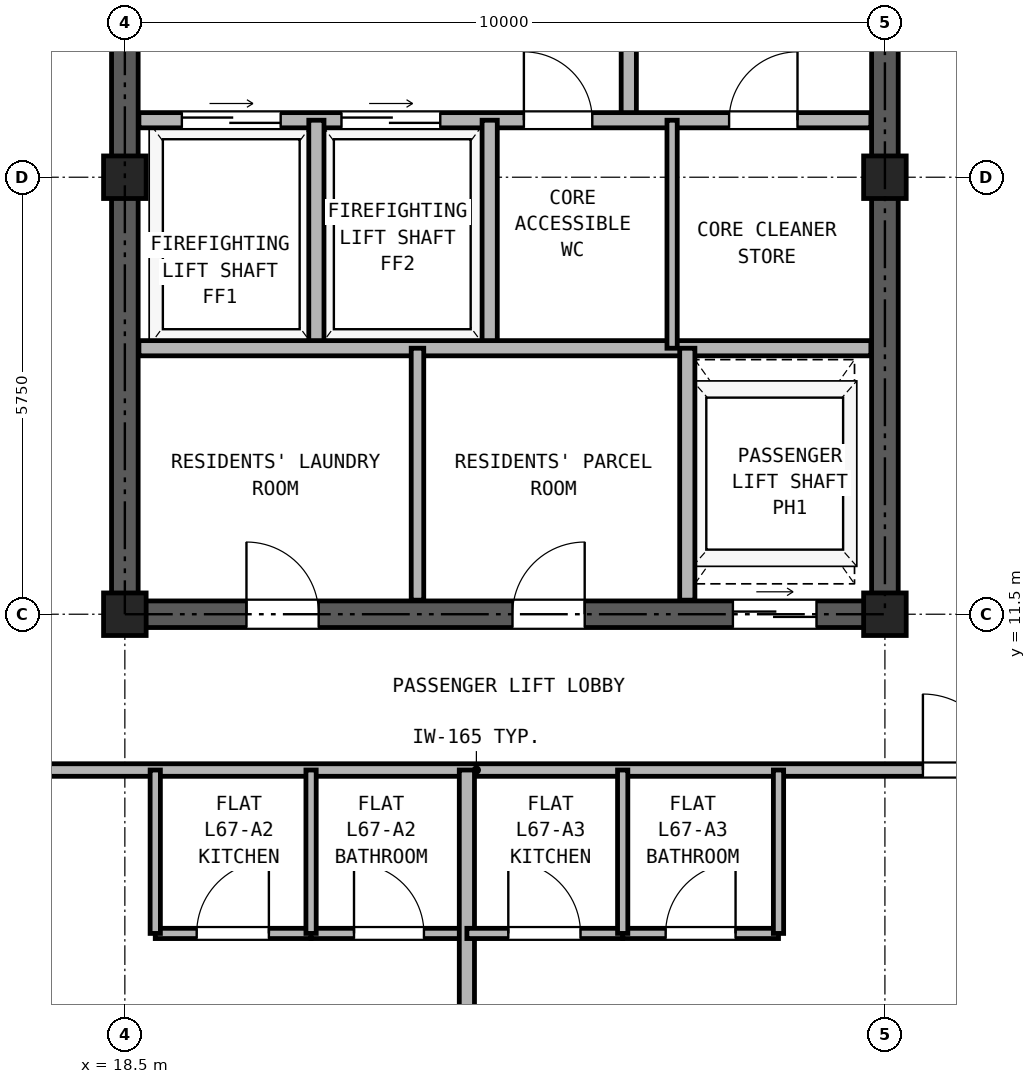
"""IFC4 building model, lengths in metres.
Left out: names, types, materials, properties, quantities, classifications, styles, units other than length and angle.
Written with IfcOpenShell. Run it as: python <this file> out.ifc"""

import sys

from ifc_helpers import new_model, si_unit, direction, frame, frame_2d, origin, origin_2d, place, context, subcontext, project, spatial, rectangle, hollow_rectangle, extrude, source, transform, mapped, element, fill, save


model = new_model("IFC4")
c1 = context("Model", 3, precision=1e-05, world=origin(), true_north=direction((0.0, 1.0)))
c2 = subcontext(c1, "Body", "Model", "MODEL_VIEW")
j1 = project(units=[si_unit("LENGTHUNIT", "METRE"), si_unit("PLANEANGLEUNIT", "RADIAN")], contexts=[c1])
p1 = place(None, origin())
s1 = spatial("IfcSite", under=j1, at=p1, CompositionType="ELEMENT")
p2 = place(p1, origin())
s2 = spatial("IfcBuilding", under=s1, at=p2, CompositionType="ELEMENT")
p3 = place(p2, frame((0.0, 0.0, 236.1)))
s3 = spatial("IfcBuildingStorey", under=s2, at=p3, CompositionType="ELEMENT", Elevation=236.1)
m1 = source(origin(), c2, "Body", "SweptSolid", [
    extrude(hollow_rectangle(XDim=0.56, YDim=0.56, WallThickness=0.03, at=origin_2d()), origin(), (0.0, 0.0, 1.0), 2.98),
])
for number, where, z_axis, x_axis in (
    (1, (18.5, 11.5, 0.0), (0.0, 0.0, 1.0), (1.0, 0.0, 0.0)),
    (2, (18.5, 17.25, 0.0), (0.0, 0.0, 1.0), (1.0, 0.0, 0.0)),
    (3, (28.5, 11.5, 0.0), (0.0, 0.0, 1.0), (1.0, 0.0, 0.0)),
    (4, (28.5, 17.25, 0.0), (0.0, 0.0, 1.0), (1.0, 0.0, 0.0)),
):
    element("IfcColumn", number, at=place(p3, frame(where, z_axis=z_axis, x_axis=x_axis)), inside=s3, PredefinedType="COLUMN", context=c2, shape_type="MappedRepresentation", body=[
        mapped(m1, transform((0.0, 0.0, 0.0), x_axis=(1.0, 0.0, 0.0), y_axis=(0.0, 1.0, 0.0), z_axis=(0.0, 0.0, 1.0), scale=1.0)),
    ])
p4 = place(p3, frame((18.325, 11.5, 0.0), z_axis=(0.0, 0.0, 1.0), x_axis=(1.0, 0.0, 0.0)))
e5 = element("IfcWall", 5, at=p4, inside=s3, PredefinedType="SHEAR", context=c2, shape_type="SweptSolid", body=[
    extrude(rectangle(XDim=10.35, YDim=0.35, at=frame_2d((5.175, 0.0))), origin(), (0.0, 0.0, 1.0), 2.98),
])
p5 = place(p4, frame((1.775, 0.0, 0.0)))
e6 = element("IfcOpeningElement", 6, at=p5, cuts=e5, PredefinedType="OPENING", context=c2, shape_type="SweptSolid", body=[
    extrude(rectangle(XDim=0.95, YDim=2.15, at=frame_2d((0.475, 1.075))), frame((0.0, 0.185, 0.0), z_axis=(0.0, -1.0, 0.0), x_axis=(1.0, 0.0, 0.0)), (0.0, 0.0, 1.0), 0.37),
])
p6 = place(p4, frame((5.275, 0.0, 0.0)))
e7 = element("IfcOpeningElement", 7, at=p6, cuts=e5, PredefinedType="OPENING", context=c2, shape_type="SweptSolid", body=[
    extrude(rectangle(XDim=0.95, YDim=2.15, at=frame_2d((0.475, 1.075))), frame((0.0, 0.185, 0.0), z_axis=(0.0, -1.0, 0.0), x_axis=(1.0, 0.0, 0.0)), (0.0, 0.0, 1.0), 0.37),
])
p7 = place(p4, frame((8.175, 0.0, 0.0)))
e8 = element("IfcOpeningElement", 8, at=p7, cuts=e5, PredefinedType="OPENING", context=c2, shape_type="SweptSolid", body=[
    extrude(rectangle(XDim=1.1, YDim=2.25, at=frame_2d((0.55, 1.125))), frame((0.0, 0.185, 0.0), z_axis=(0.0, -1.0, 0.0), x_axis=(1.0, 0.0, 0.0)), (0.0, 0.0, 1.0), 0.37),
])
p8 = place(p3, frame((18.5, 11.675, 0.0), z_axis=(0.0, 0.0, 1.0), x_axis=(0.0, 1.0, 0.0)))
e9 = element("IfcWall", 9, at=p8, inside=s3, PredefinedType="SHEAR", context=c2, shape_type="SweptSolid", body=[
    extrude(rectangle(XDim=16.9, YDim=0.35, at=frame_2d((8.45, 0.0))), origin(), (0.0, 0.0, 1.0), 2.98),
])
p9 = place(p8, frame((7.475, 0.0, 0.0)))
e10 = element("IfcOpeningElement", 10, at=p9, cuts=e9, PredefinedType="OPENING", context=c2, shape_type="SweptSolid", body=[
    extrude(rectangle(XDim=1.15, YDim=2.2, at=frame_2d((0.575, 1.1))), frame((0.0, 0.185, 0.0), z_axis=(0.0, -1.0, 0.0), x_axis=(1.0, 0.0, 0.0)), (0.0, 0.0, 1.0), 0.37),
])
p10 = place(p3, frame((28.5, 11.675, 0.0), z_axis=(0.0, 0.0, 1.0), x_axis=(0.0, 1.0, 0.0)))
e11 = element("IfcWall", 11, at=p10, inside=s3, PredefinedType="SHEAR", context=c2, shape_type="SweptSolid", body=[
    extrude(rectangle(XDim=16.9, YDim=0.35, at=frame_2d((8.45, 0.0))), origin(), (0.0, 0.0, 1.0), 2.98),
])
p11 = place(p10, frame((7.475, 0.0, 0.0)))
e12 = element("IfcOpeningElement", 12, at=p11, cuts=e11, PredefinedType="OPENING", context=c2, shape_type="SweptSolid", body=[
    extrude(rectangle(XDim=1.15, YDim=2.2, at=frame_2d((0.575, 1.1))), frame((0.0, 0.185, 0.0), z_axis=(0.0, -1.0, 0.0), x_axis=(1.0, 0.0, 0.0)), (0.0, 0.0, 1.0), 0.37),
])
p12 = place(p3, frame((25.13, 18.0, 0.0), z_axis=(0.0, 0.0, 1.0), x_axis=(0.0, 1.0, 0.0)))
e13 = element("IfcWall", 13, at=p12, inside=s3, PredefinedType="PARTITIONING", context=c2, shape_type="SweptSolid", body=[
    extrude(rectangle(XDim=3.39, YDim=0.2, at=frame_2d((1.695, 0.0))), origin(), (0.0, 0.0, 1.0), 2.98),
])
p13 = place(p12, frame((1.1, 0.0, 0.0)))
e14 = element("IfcOpeningElement", 14, at=p13, cuts=e13, PredefinedType="OPENING", context=c2, shape_type="SweptSolid", body=[
    extrude(rectangle(XDim=1.15, YDim=2.2, at=frame_2d((0.575, 1.1))), frame((0.0, 0.11, 0.0), z_axis=(0.0, -1.0, 0.0), x_axis=(1.0, 0.0, 0.0)), (0.0, 0.0, 1.0), 0.22),
])
p14 = place(p3, frame((18.685, 18.0, 0.0), z_axis=(0.0, 0.0, 1.0), x_axis=(1.0, 0.0, 0.0)))
e15 = element("IfcWall", 15, at=p14, inside=s3, PredefinedType="PARTITIONING", context=c2, shape_type="SweptSolid", body=[
    extrude(rectangle(XDim=9.63, YDim=0.2, at=frame_2d((4.815, 0.0))), origin(), (0.0, 0.0, 1.0), 2.98),
])
p15 = place(p14, frame((0.565, 0.0, 0.0)))
e16 = element("IfcOpeningElement", 16, at=p15, cuts=e15, PredefinedType="OPENING", context=c2, shape_type="SweptSolid", body=[
    extrude(rectangle(XDim=1.3, YDim=2.3, at=frame_2d((0.65, 1.15))), frame((0.0, 0.11, 0.0), z_axis=(0.0, -1.0, 0.0), x_axis=(1.0, 0.0, 0.0)), (0.0, 0.0, 1.0), 0.22),
])
p16 = place(p14, frame((2.665, 0.0, 0.0)))
e17 = element("IfcOpeningElement", 17, at=p16, cuts=e15, PredefinedType="OPENING", context=c2, shape_type="SweptSolid", body=[
    extrude(rectangle(XDim=1.3, YDim=2.3, at=frame_2d((0.65, 1.15))), frame((0.0, 0.11, 0.0), z_axis=(0.0, -1.0, 0.0), x_axis=(1.0, 0.0, 0.0)), (0.0, 0.0, 1.0), 0.22),
])
p17 = place(p14, frame((5.065, 0.0, 0.0)))
e18 = element("IfcOpeningElement", 18, at=p17, cuts=e15, PredefinedType="OPENING", context=c2, shape_type="SweptSolid", body=[
    extrude(rectangle(XDim=0.9, YDim=2.05, at=frame_2d((0.45, 1.025))), frame((0.0, 0.11, 0.0), z_axis=(0.0, -1.0, 0.0), x_axis=(1.0, 0.0, 0.0)), (0.0, 0.0, 1.0), 0.22),
])
p18 = place(p14, frame((7.765, 0.0, 0.0)))
e19 = element("IfcOpeningElement", 19, at=p18, cuts=e15, PredefinedType="OPENING", context=c2, shape_type="SweptSolid", body=[
    extrude(rectangle(XDim=0.9, YDim=2.05, at=frame_2d((0.45, 1.025))), frame((0.0, 0.11, 0.0), z_axis=(0.0, -1.0, 0.0), x_axis=(1.0, 0.0, 0.0)), (0.0, 0.0, 1.0), 0.22),
])
for number, where, z_axis, x_axis in (
    (20, (21.02, 15.0, 0.0), (0.0, 0.0, 1.0), (0.0, 1.0, 0.0)),
    (21, (23.3, 15.0, 0.0), (0.0, 0.0, 1.0), (0.0, 1.0, 0.0)),
):
    element("IfcWall", number, at=place(p3, frame(where, z_axis=z_axis, x_axis=x_axis)), inside=s3, PredefinedType="PARTITIONING", context=c2, shape_type="SweptSolid", body=[
        extrude(rectangle(XDim=3.0, YDim=0.2, at=frame_2d((1.5, 0.0))), origin(), (0.0, 0.0, 1.0), 2.98),
    ])
p19 = place(p3, frame((18.685, 15.0, 0.0), z_axis=(0.0, 0.0, 1.0), x_axis=(1.0, 0.0, 0.0)))
e22 = element("IfcWall", 22, at=p19, inside=s3, PredefinedType="PARTITIONING", context=c2, shape_type="SweptSolid", body=[
    extrude(rectangle(XDim=9.63, YDim=0.2, at=frame_2d((4.815, 0.0))), origin(), (0.0, 0.0, 1.0), 2.98),
])
p20 = place(p3, frame((25.7, 15.0, 0.0), z_axis=(0.0, 0.0, 1.0), x_axis=(0.0, 1.0, 0.0)))
e23 = element("IfcWall", 23, at=p20, inside=s3, PredefinedType="PARTITIONING", context=c2, shape_type="SweptSolid", body=[
    extrude(rectangle(XDim=3.0, YDim=0.135, at=frame_2d((1.5, 0.0))), origin(), (0.0, 0.0, 1.0), 2.98),
])
p21 = place(p3, frame((22.35, 11.685, 0.0), z_axis=(0.0, 0.0, 1.0), x_axis=(0.0, 1.0, 0.0)))
e24 = element("IfcWall", 24, at=p21, inside=s3, PredefinedType="PARTITIONING", context=c2, shape_type="SweptSolid", body=[
    extrude(rectangle(XDim=3.315, YDim=0.165, at=frame_2d((1.657, 0.0))), origin(), (0.0, 0.0, 1.0), 2.98),
])
p22 = place(p3, frame((25.9, 11.685, 0.0), z_axis=(0.0, 0.0, 1.0), x_axis=(0.0, 1.0, 0.0)))
e25 = element("IfcWall", 25, at=p22, inside=s3, PredefinedType="PARTITIONING", context=c2, shape_type="SweptSolid", body=[
    extrude(rectangle(XDim=3.315, YDim=0.2, at=frame_2d((1.657, 0.0))), origin(), (0.0, 0.0, 1.0), 2.98),
])
p23 = place(p3, frame((5.36, 9.45, 0.0), z_axis=(0.0, 0.0, 1.0), x_axis=(1.0, 0.0, 0.0)))
e26 = element("IfcWall", 26, at=p23, inside=s3, PredefinedType="PARTITIONING", context=c2, shape_type="SweptSolid", body=[
    extrude(rectangle(XDim=36.28, YDim=0.165, at=frame_2d((18.14, 0.0))), origin(), (0.0, 0.0, 1.0), 2.98),
])
p24 = place(p23, frame((7.115, 0.0, 0.0)))
e27 = element("IfcOpeningElement", 27, at=p24, cuts=e26, PredefinedType="OPENING", context=c2, shape_type="SweptSolid", body=[
    extrude(rectangle(XDim=1.0, YDim=2.15, at=frame_2d((0.5, 1.075))), frame((0.0, 0.093, 0.0), z_axis=(0.0, -1.0, 0.0), x_axis=(1.0, 0.0, 0.0)), (0.0, 0.0, 1.0), 0.185),
])
p25 = place(p23, frame((10.89, 0.0, 0.0)))
e28 = element("IfcOpeningElement", 28, at=p25, cuts=e26, PredefinedType="OPENING", context=c2, shape_type="SweptSolid", body=[
    extrude(rectangle(XDim=1.0, YDim=2.15, at=frame_2d((0.5, 1.075))), frame((0.0, 0.093, 0.0), z_axis=(0.0, -1.0, 0.0), x_axis=(1.0, 0.0, 0.0)), (0.0, 0.0, 1.0), 0.185),
])
p26 = place(p23, frame((23.64, 0.0, 0.0)))
e29 = element("IfcOpeningElement", 29, at=p26, cuts=e26, PredefinedType="OPENING", context=c2, shape_type="SweptSolid", body=[
    extrude(rectangle(XDim=1.0, YDim=2.15, at=frame_2d((0.5, 1.075))), frame((0.0, 0.093, 0.0), z_axis=(0.0, -1.0, 0.0), x_axis=(1.0, 0.0, 0.0)), (0.0, 0.0, 1.0), 0.185),
])
p27 = place(p23, frame((27.915, 0.0, 0.0)))
e30 = element("IfcOpeningElement", 30, at=p27, cuts=e26, PredefinedType="OPENING", context=c2, shape_type="SweptSolid", body=[
    extrude(rectangle(XDim=1.0, YDim=2.15, at=frame_2d((0.5, 1.075))), frame((0.0, 0.093, 0.0), z_axis=(0.0, -1.0, 0.0), x_axis=(1.0, 0.0, 0.0)), (0.0, 0.0, 1.0), 0.185),
])
p28 = place(p3, frame((18.9, 7.3, 0.0), z_axis=(0.0, 0.0, 1.0), x_axis=(1.0, 0.0, 0.0)))
e31 = element("IfcWall", 31, at=p28, inside=s3, PredefinedType="PARTITIONING", context=c2, shape_type="SweptSolid", body=[
    extrude(rectangle(XDim=2.05, YDim=0.135, at=frame_2d((1.025, 0.0))), origin(), (0.0, 0.0, 1.0), 2.98),
])
p29 = place(p28, frame((0.545, 0.0, 0.0)))
e32 = element("IfcOpeningElement", 32, at=p29, cuts=e31, PredefinedType="OPENING", context=c2, shape_type="SweptSolid", body=[
    extrude(rectangle(XDim=0.95, YDim=2.15, at=frame_2d((0.475, 1.075))), frame((0.0, 0.077, 0.0), z_axis=(0.0, -1.0, 0.0), x_axis=(1.0, 0.0, 0.0)), (0.0, 0.0, 1.0), 0.155),
])
p30 = place(p3, frame((20.95, 7.3, 0.0), z_axis=(0.0, 0.0, 1.0), x_axis=(1.0, 0.0, 0.0)))
e33 = element("IfcWall", 33, at=p30, inside=s3, PredefinedType="PARTITIONING", context=c2, shape_type="SweptSolid", body=[
    extrude(rectangle(XDim=2.05, YDim=0.135, at=frame_2d((1.025, 0.0))), origin(), (0.0, 0.0, 1.0), 2.98),
])
p31 = place(p30, frame((0.565, 0.0, 0.0)))
e34 = element("IfcOpeningElement", 34, at=p31, cuts=e33, PredefinedType="OPENING", context=c2, shape_type="SweptSolid", body=[
    extrude(rectangle(XDim=0.92, YDim=2.1, at=frame_2d((0.46, 1.05))), frame((0.0, 0.077, 0.0), z_axis=(0.0, -1.0, 0.0), x_axis=(1.0, 0.0, 0.0)), (0.0, 0.0, 1.0), 0.155),
])
for number, where, z_axis, x_axis in (
    (35, (18.9, 7.3, 0.0), (0.0, 0.0, 1.0), (0.0, 1.0, 0.0)),
    (36, (20.95, 7.3, 0.0), (0.0, 0.0, 1.0), (0.0, 1.0, 0.0)),
):
    element("IfcWall", number, at=place(p3, frame(where, z_axis=z_axis, x_axis=x_axis)), inside=s3, PredefinedType="PARTITIONING", context=c2, shape_type="SweptSolid", body=[
        extrude(rectangle(XDim=2.15, YDim=0.135, at=frame_2d((1.075, 0.0))), origin(), (0.0, 0.0, 1.0), 2.98),
    ])
p32 = place(p3, frame((23.0, 0.16, 0.0), z_axis=(0.0, 0.0, 1.0), x_axis=(0.0, 1.0, 0.0)))
e37 = element("IfcWall", 37, at=p32, inside=s3, PredefinedType="PARTITIONING", context=c2, shape_type="SweptSolid", body=[
    extrude(rectangle(XDim=9.29, YDim=0.2, at=frame_2d((4.645, 0.0))), origin(), (0.0, 0.0, 1.0), 2.98),
])
p33 = place(p3, frame((23.0, 7.3, 0.0), z_axis=(0.0, 0.0, 1.0), x_axis=(1.0, 0.0, 0.0)))
e38 = element("IfcWall", 38, at=p33, inside=s3, PredefinedType="PARTITIONING", context=c2, shape_type="SweptSolid", body=[
    extrude(rectangle(XDim=2.05, YDim=0.135, at=frame_2d((1.025, 0.0))), origin(), (0.0, 0.0, 1.0), 2.98),
])
p34 = place(p33, frame((0.545, 0.0, 0.0)))
e39 = element("IfcOpeningElement", 39, at=p34, cuts=e38, PredefinedType="OPENING", context=c2, shape_type="SweptSolid", body=[
    extrude(rectangle(XDim=0.95, YDim=2.15, at=frame_2d((0.475, 1.075))), frame((0.0, 0.077, 0.0), z_axis=(0.0, -1.0, 0.0), x_axis=(1.0, 0.0, 0.0)), (0.0, 0.0, 1.0), 0.155),
])
p35 = place(p3, frame((25.05, 7.3, 0.0), z_axis=(0.0, 0.0, 1.0), x_axis=(1.0, 0.0, 0.0)))
e40 = element("IfcWall", 40, at=p35, inside=s3, PredefinedType="PARTITIONING", context=c2, shape_type="SweptSolid", body=[
    extrude(rectangle(XDim=2.05, YDim=0.135, at=frame_2d((1.025, 0.0))), origin(), (0.0, 0.0, 1.0), 2.98),
])
p36 = place(p35, frame((0.565, 0.0, 0.0)))
e41 = element("IfcOpeningElement", 41, at=p36, cuts=e40, PredefinedType="OPENING", context=c2, shape_type="SweptSolid", body=[
    extrude(rectangle(XDim=0.92, YDim=2.1, at=frame_2d((0.46, 1.05))), frame((0.0, 0.077, 0.0), z_axis=(0.0, -1.0, 0.0), x_axis=(1.0, 0.0, 0.0)), (0.0, 0.0, 1.0), 0.155),
])
for number, where, z_axis, x_axis in (
    (42, (25.05, 7.3, 0.0), (0.0, 0.0, 1.0), (0.0, 1.0, 0.0)),
    (43, (27.1, 7.3, 0.0), (0.0, 0.0, 1.0), (0.0, 1.0, 0.0)),
):
    element("IfcWall", number, at=place(p3, frame(where, z_axis=z_axis, x_axis=x_axis)), inside=s3, PredefinedType="PARTITIONING", context=c2, shape_type="SweptSolid", body=[
        extrude(rectangle(XDim=2.15, YDim=0.135, at=frame_2d((1.075, 0.0))), origin(), (0.0, 0.0, 1.0), 2.98),
    ])
p37 = place(p15, origin())
e44 = element("IfcDoor", 44, at=p37, inside=s3, OperationType="DOUBLE_DOOR_SLIDING", PredefinedType="DOOR", context=c2, shape_type="SweptSolid", body=[
    extrude(rectangle(XDim=1.3, YDim=2.3, at=frame_2d((0.65, 1.15))), frame((0.0, 0.025, 0.0), z_axis=(0.0, -1.0, 0.0), x_axis=(1.0, 0.0, 0.0)), (0.0, 0.0, 1.0), 0.05),
])
fill(e16, e44)
p38 = place(p16, origin())
e45 = element("IfcDoor", 45, at=p38, inside=s3, OperationType="DOUBLE_DOOR_SLIDING", PredefinedType="DOOR", context=c2, shape_type="SweptSolid", body=[
    extrude(rectangle(XDim=1.3, YDim=2.3, at=frame_2d((0.65, 1.15))), frame((0.0, 0.025, 0.0), z_axis=(0.0, -1.0, 0.0), x_axis=(1.0, 0.0, 0.0)), (0.0, 0.0, 1.0), 0.05),
])
fill(e17, e45)
p39 = place(p17, frame((0.9, 0.0, 0.0), z_axis=(0.0, 0.0, 1.0), x_axis=(-1.0, 0.0, 0.0)))
e46 = element("IfcDoor", 46, at=p39, inside=s3, OperationType="SINGLE_SWING_LEFT", PredefinedType="DOOR", context=c2, shape_type="SweptSolid", body=[
    extrude(rectangle(XDim=0.9, YDim=2.05, at=frame_2d((0.45, 1.025))), frame((0.0, 0.025, 0.0), z_axis=(0.0, -1.0, 0.0), x_axis=(1.0, 0.0, 0.0)), (0.0, 0.0, 1.0), 0.05),
])
fill(e18, e46)
p40 = place(p18, frame((0.9, 0.0, 0.0), z_axis=(0.0, 0.0, 1.0), x_axis=(-1.0, 0.0, 0.0)))
e47 = element("IfcDoor", 47, at=p40, inside=s3, OperationType="SINGLE_SWING_RIGHT", PredefinedType="DOOR", context=c2, shape_type="SweptSolid", body=[
    extrude(rectangle(XDim=0.9, YDim=2.05, at=frame_2d((0.45, 1.025))), frame((0.0, 0.025, 0.0), z_axis=(0.0, -1.0, 0.0), x_axis=(1.0, 0.0, 0.0)), (0.0, 0.0, 1.0), 0.05),
])
fill(e19, e47)
p41 = place(p5, frame((0.95, 0.0, 0.0), z_axis=(0.0, 0.0, 1.0), x_axis=(-1.0, 0.0, 0.0)))
e48 = element("IfcDoor", 48, at=p41, inside=s3, OperationType="SINGLE_SWING_LEFT", PredefinedType="DOOR", context=c2, shape_type="SweptSolid", body=[
    extrude(rectangle(XDim=0.95, YDim=2.15, at=frame_2d((0.475, 1.075))), frame((0.0, 0.025, 0.0), z_axis=(0.0, -1.0, 0.0), x_axis=(1.0, 0.0, 0.0)), (0.0, 0.0, 1.0), 0.05),
])
fill(e6, e48)
p42 = place(p6, frame((0.95, 0.0, 0.0), z_axis=(0.0, 0.0, 1.0), x_axis=(-1.0, 0.0, 0.0)))
e49 = element("IfcDoor", 49, at=p42, inside=s3, OperationType="SINGLE_SWING_RIGHT", PredefinedType="DOOR", context=c2, shape_type="SweptSolid", body=[
    extrude(rectangle(XDim=0.95, YDim=2.15, at=frame_2d((0.475, 1.075))), frame((0.0, 0.025, 0.0), z_axis=(0.0, -1.0, 0.0), x_axis=(1.0, 0.0, 0.0)), (0.0, 0.0, 1.0), 0.05),
])
fill(e7, e49)
p43 = place(p7, frame((1.1, 0.0, 0.0), z_axis=(0.0, 0.0, 1.0), x_axis=(-1.0, 0.0, 0.0)))
e50 = element("IfcDoor", 50, at=p43, inside=s3, OperationType="DOUBLE_DOOR_SLIDING", PredefinedType="DOOR", context=c2, shape_type="SweptSolid", body=[
    extrude(rectangle(XDim=1.1, YDim=2.25, at=frame_2d((0.55, 1.125))), frame((0.0, 0.025, 0.0), z_axis=(0.0, -1.0, 0.0), x_axis=(1.0, 0.0, 0.0)), (0.0, 0.0, 1.0), 0.05),
])
fill(e8, e50)
p44 = place(p29, origin())
e51 = element("IfcDoor", 51, at=p44, inside=s3, OperationType="SINGLE_SWING_RIGHT", PredefinedType="DOOR", context=c2, shape_type="SweptSolid", body=[
    extrude(rectangle(XDim=0.95, YDim=2.15, at=frame_2d((0.475, 1.075))), frame((0.0, 0.025, 0.0), z_axis=(0.0, -1.0, 0.0), x_axis=(1.0, 0.0, 0.0)), (0.0, 0.0, 1.0), 0.05),
])
fill(e32, e51)
p45 = place(p31, origin())
e52 = element("IfcDoor", 52, at=p45, inside=s3, OperationType="SINGLE_SWING_LEFT", PredefinedType="DOOR", context=c2, shape_type="SweptSolid", body=[
    extrude(rectangle(XDim=0.92, YDim=2.1, at=frame_2d((0.46, 1.05))), frame((0.0, 0.025, 0.0), z_axis=(0.0, -1.0, 0.0), x_axis=(1.0, 0.0, 0.0)), (0.0, 0.0, 1.0), 0.05),
])
fill(e34, e52)
p46 = place(p34, origin())
e53 = element("IfcDoor", 53, at=p46, inside=s3, OperationType="SINGLE_SWING_LEFT", PredefinedType="DOOR", context=c2, shape_type="SweptSolid", body=[
    extrude(rectangle(XDim=0.95, YDim=2.15, at=frame_2d((0.475, 1.075))), frame((0.0, 0.025, 0.0), z_axis=(0.0, -1.0, 0.0), x_axis=(1.0, 0.0, 0.0)), (0.0, 0.0, 1.0), 0.05),
])
fill(e39, e53)
p47 = place(p36, origin())
e54 = element("IfcDoor", 54, at=p47, inside=s3, OperationType="SINGLE_SWING_RIGHT", PredefinedType="DOOR", context=c2, shape_type="SweptSolid", body=[
    extrude(rectangle(XDim=0.92, YDim=2.1, at=frame_2d((0.46, 1.05))), frame((0.0, 0.025, 0.0), z_axis=(0.0, -1.0, 0.0), x_axis=(1.0, 0.0, 0.0)), (0.0, 0.0, 1.0), 0.05),
])
fill(e41, e54)
p48 = place(p26, frame((1.0, 0.0, 0.0), z_axis=(0.0, 0.0, 1.0), x_axis=(-1.0, 0.0, 0.0)))
e55 = element("IfcDoor", 55, at=p48, inside=s3, OperationType="SINGLE_SWING_LEFT", PredefinedType="DOOR", context=c2, shape_type="SweptSolid", body=[
    extrude(rectangle(XDim=1.0, YDim=2.15, at=frame_2d((0.5, 1.075))), frame((0.0, 0.025, 0.0), z_axis=(0.0, -1.0, 0.0), x_axis=(1.0, 0.0, 0.0)), (0.0, 0.0, 1.0), 0.05),
])
fill(e29, e55)
save(model, sys.argv[1])
